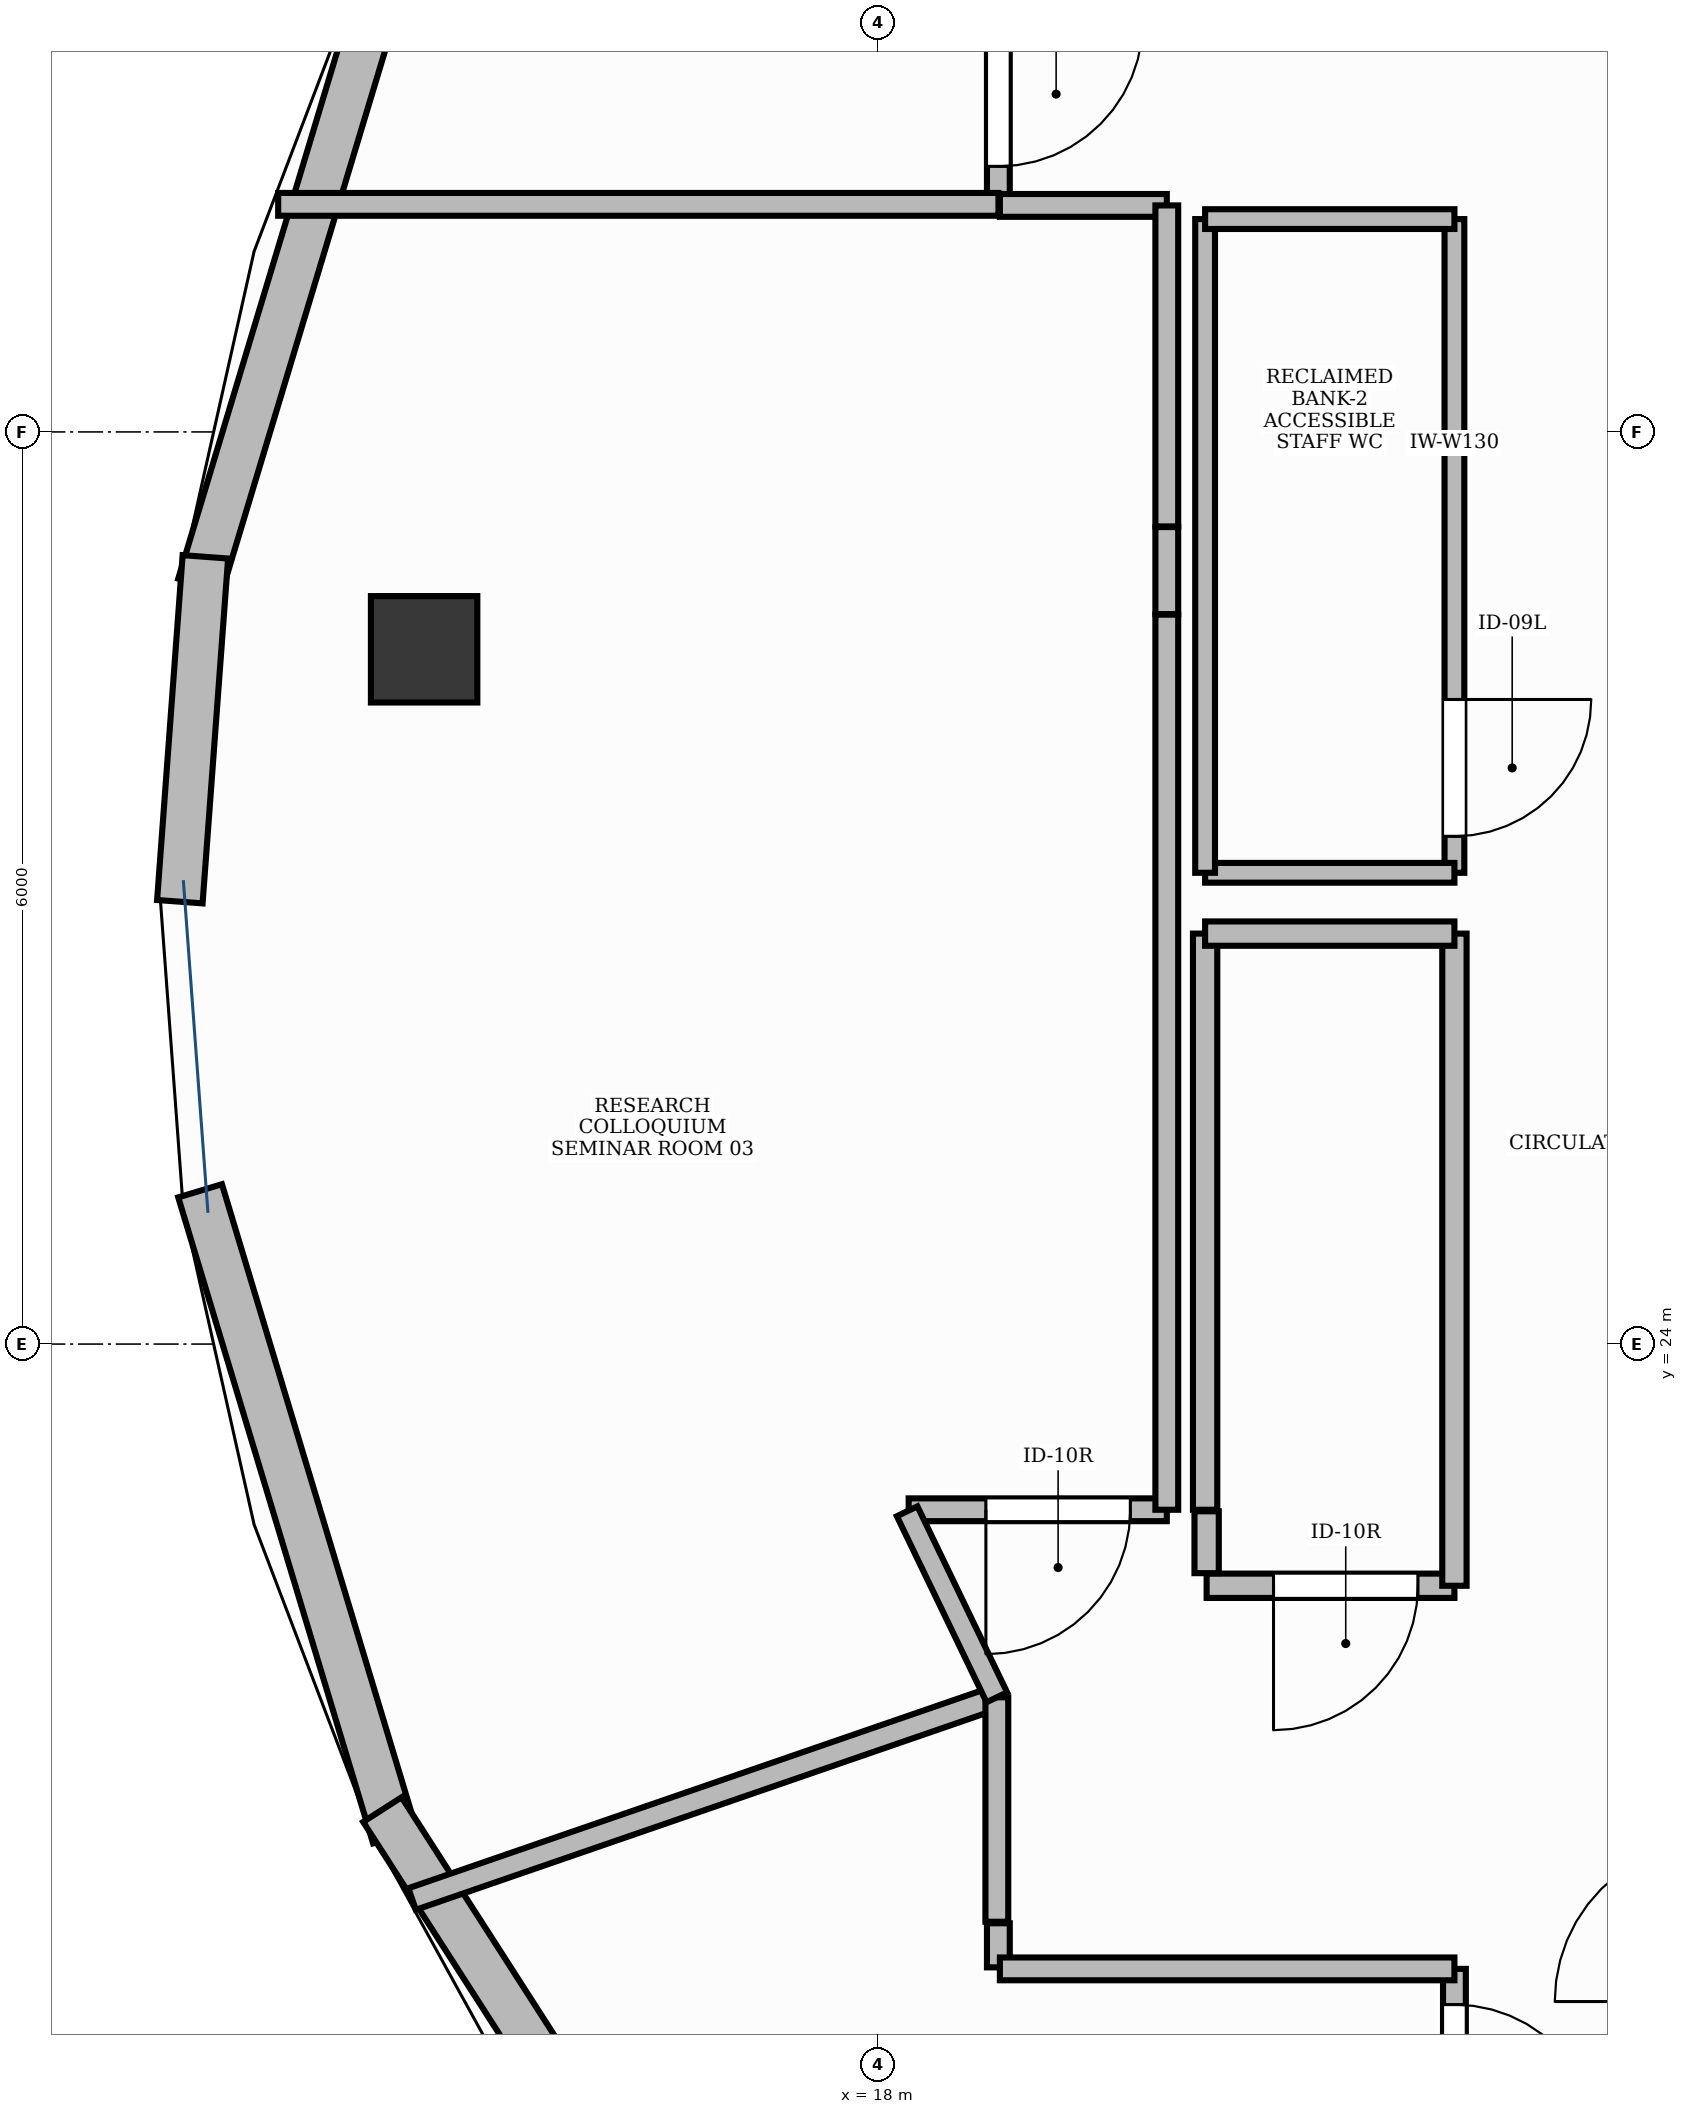
"""IFC4 building model, lengths in metres.
Left out: names, types, materials, properties, quantities, classifications, styles, units other than length and angle.
Written with IfcOpenShell. Run it as: python <this file> out.ifc"""

import sys

from ifc_helpers import new_model, si_unit, direction, frame, frame_2d, origin, origin_2d, place, context, subcontext, project, spatial, rectangle, extrude, element, fill, save


model = new_model("IFC4")
c1 = context("Model", 3, precision=1e-05, world=origin(), true_north=direction((0.0, 1.0)))
c2 = subcontext(c1, "Body", "Model", "MODEL_VIEW")
j1 = project(units=[si_unit("LENGTHUNIT", "METRE"), si_unit("PLANEANGLEUNIT", "RADIAN")], contexts=[c1])
p1 = place(None, origin())
s1 = spatial("IfcSite", under=j1, at=p1, CompositionType="ELEMENT")
p2 = place(p1, origin())
s2 = spatial("IfcBuilding", under=s1, at=p2, CompositionType="ELEMENT")
p3 = place(p2, frame((0.0, 0.0, 322.8)))
s3 = spatial("IfcBuildingStorey", under=s2, at=p3, CompositionType="ELEMENT", Elevation=322.8)
p4 = place(p3, frame((15.013, 28.57, -0.0), z_axis=(0.0, 0.0, 1.0), x_axis=(0.0, 1.0, 0.0)))
e1 = element("IfcColumn", 1, at=p4, inside=s3, PredefinedType="COLUMN", context=c2, shape_type="SweptSolid", body=[
    extrude(rectangle(XDim=0.7, YDim=0.7, at=origin_2d()), origin(), (0.0, 0.0, 1.0), 3.901),
])
p5 = place(p3, frame((14.821, 33.241, 0.0), z_axis=(0.0, 0.0, 1.0), x_axis=(-0.288720187326, -0.95741352269, 0.0)))
e2 = element("IfcWall", 2, at=p5, inside=s3, PredefinedType="STANDARD", context=c2, shape_type="SweptSolid", body=[
    extrude(rectangle(XDim=4.438, YDim=0.3, at=frame_2d((2.219, 0.0))), origin(), (0.0, 0.0, 1.0), 3.9),
])
p6 = place(p3, frame((13.573, 29.178, 0.0), z_axis=(0.0, 0.0, 1.0), x_axis=(-0.073741209899, -0.997277410735, 0.0)))
e3 = element("IfcWall", 3, at=p6, inside=s3, PredefinedType="STANDARD", context=c2, shape_type="SweptSolid", body=[
    extrude(rectangle(XDim=2.274, YDim=0.3, at=frame_2d((1.137, 0.0))), origin(), (0.0, 0.0, 1.0), 3.9),
])
p7 = place(p3, frame((13.539, 25.008, 0.0), z_axis=(0.0, 0.0, 1.0), x_axis=(0.288720187326, -0.95741352269, 0.0)))
e4 = element("IfcWall", 4, at=p7, inside=s3, PredefinedType="STANDARD", context=c2, shape_type="SweptSolid", body=[
    extrude(rectangle(XDim=4.438, YDim=0.3, at=frame_2d((2.219, 0.0))), origin(), (0.0, 0.0, 1.0), 3.9),
])
p8 = place(p3, frame((14.738, 20.938, 0.0), z_axis=(0.0, 0.0, 1.0), x_axis=(0.540087262842, -0.841609023547, 0.0)))
e5 = element("IfcWall", 5, at=p8, inside=s3, PredefinedType="STANDARD", context=c2, shape_type="SweptSolid", body=[
    extrude(rectangle(XDim=4.603, YDim=0.3, at=frame_2d((2.302, 0.0))), origin(), (0.0, 0.0, 1.0), 3.9),
])
p9 = place(p3, frame((21.79, 22.41, 0.0), z_axis=(0.0, 0.0, 1.0), x_axis=(-1.0, 0.0, 0.0)))
e6 = element("IfcWall", 6, at=p9, inside=s3, PredefinedType="PARTITIONING", context=c2, shape_type="SweptSolid", body=[
    extrude(rectangle(XDim=1.63, YDim=0.16, at=frame_2d((0.815, 0.0))), origin(), (0.0, 0.0, 1.0), 2.22),
])
p10 = place(p9, frame((0.24, 0.0, 0.0)))
e7 = element("IfcOpeningElement", 7, at=p10, cuts=e6, PredefinedType="OPENING", context=c2, shape_type="SweptSolid", body=[
    extrude(rectangle(XDim=0.95, YDim=2.15, at=frame_2d((0.475, 1.075))), frame((0.0, 0.095, 0.0), z_axis=(0.0, -1.0, 0.0), x_axis=(1.0, 0.0, 0.0)), (0.0, 0.0, 1.0), 0.19),
])
p11 = place(p3, frame((21.79, 31.4, 0.0), z_axis=(0.0, 0.0, 1.0), x_axis=(0.0, -1.0, 0.0)))
e8 = element("IfcWall", 8, at=p11, inside=s3, PredefinedType="PARTITIONING", context=c2, shape_type="SweptSolid", body=[
    extrude(rectangle(XDim=4.3, YDim=0.13, at=frame_2d((2.15, 0.0))), origin(), (0.0, 0.0, 1.0), 2.22),
])
p12 = place(p11, frame((3.16, 0.0, 0.0)))
e9 = element("IfcOpeningElement", 9, at=p12, cuts=e8, PredefinedType="OPENING", context=c2, shape_type="SweptSolid", body=[
    extrude(rectangle(XDim=0.9, YDim=2.15, at=frame_2d((0.45, 1.075))), frame((0.0, 0.08, 0.0), z_axis=(0.0, -1.0, 0.0), x_axis=(1.0, 0.0, 0.0)), (0.0, 0.0, 1.0), 0.16),
])
p13 = place(p3, frame((21.79, 19.89, 0.0), z_axis=(0.0, 0.0, 1.0), x_axis=(0.0, -1.0, 0.0)))
e10 = element("IfcWall", 10, at=p13, inside=s3, PredefinedType="PARTITIONING", context=c2, shape_type="SweptSolid", body=[
    extrude(rectangle(XDim=1.44, YDim=0.15, at=frame_2d((0.72, 0.0))), origin(), (0.0, 0.0, 1.0), 2.22),
])
p14 = place(p13, frame((0.235, 0.0, 0.0)))
e11 = element("IfcOpeningElement", 11, at=p14, cuts=e10, PredefinedType="OPENING", context=c2, shape_type="SweptSolid", body=[
    extrude(rectangle(XDim=0.95, YDim=2.15, at=frame_2d((0.475, 1.075))), frame((0.0, 0.09, 0.0), z_axis=(0.0, -1.0, 0.0), x_axis=(1.0, 0.0, 0.0)), (0.0, 0.0, 1.0), 0.18),
])
p15 = place(p3, frame((19.898, 22.91, 0.0), z_axis=(0.0, 0.0, 1.0), x_axis=(-1.0, 0.0, 0.0)))
e12 = element("IfcWall", 12, at=p15, inside=s3, PredefinedType="PARTITIONING", context=c2, shape_type="SweptSolid", body=[
    extrude(rectangle(XDim=1.698, YDim=0.15, at=frame_2d((0.849, 0.0))), origin(), (0.0, 0.0, 1.0), 2.22),
])
p16 = place(p15, frame((0.24, 0.0, 0.0)))
e13 = element("IfcOpeningElement", 13, at=p16, cuts=e12, PredefinedType="OPENING", context=c2, shape_type="SweptSolid", body=[
    extrude(rectangle(XDim=0.95, YDim=2.15, at=frame_2d((0.475, 1.075))), frame((0.0, 0.09, 0.0), z_axis=(0.0, -1.0, 0.0), x_axis=(1.0, 0.0, 0.0)), (0.0, 0.0, 1.0), 0.18),
])
p17 = place(p3, frame((18.79, 34.2, 0.0), z_axis=(0.0, 0.0, 1.0), x_axis=(0.0, -1.0, 0.0)))
e14 = element("IfcWall", 14, at=p17, inside=s3, PredefinedType="PARTITIONING", context=c2, shape_type="SweptSolid", body=[
    extrude(rectangle(XDim=2.693, YDim=0.15, at=frame_2d((1.346, 0.0))), origin(), (0.0, 0.0, 1.0), 2.22),
])
p18 = place(p17, frame((1.503, 0.0, 0.0)))
e15 = element("IfcOpeningElement", 15, at=p18, cuts=e14, PredefinedType="OPENING", context=c2, shape_type="SweptSolid", body=[
    extrude(rectangle(XDim=0.95, YDim=2.15, at=frame_2d((0.475, 1.075))), frame((0.0, 0.09, 0.0), z_axis=(0.0, -1.0, 0.0), x_axis=(1.0, 0.0, 0.0)), (0.0, 0.0, 1.0), 0.18),
])
p19 = place(p3, frame((21.79, 26.7, 0.0), z_axis=(0.0, 0.0, 1.0), x_axis=(0.0, -1.0, 0.0)))
e16 = element("IfcWall", 16, at=p19, inside=s3, PredefinedType="PARTITIONING", context=c2, shape_type="SweptSolid", body=[
    extrude(rectangle(XDim=4.29, YDim=0.16, at=frame_2d((2.145, 0.0))), origin(), (0.0, 0.0, 1.0), 2.22),
])
p20 = place(p3, frame((20.16, 22.493, 0.0), z_axis=(0.0, 0.0, 1.0), x_axis=(0.0, 1.0, 0.0)))
e17 = element("IfcWall", 17, at=p20, inside=s3, PredefinedType="PARTITIONING", context=c2, shape_type="SweptSolid", body=[
    extrude(rectangle(XDim=0.407, YDim=0.16, at=frame_2d((0.204, 0.0))), origin(), (0.0, 0.0, 1.0), 2.22),
])
p21 = place(p3, frame((20.15, 22.91, 0.0), z_axis=(0.0, 0.0, 1.0), x_axis=(0.0, 1.0, 0.0)))
e18 = element("IfcWall", 18, at=p21, inside=s3, PredefinedType="PARTITIONING", context=c2, shape_type="SweptSolid", body=[
    extrude(rectangle(XDim=3.79, YDim=0.16, at=frame_2d((1.895, 0.0))), origin(), (0.0, 0.0, 1.0), 2.22),
])
p22 = place(p3, frame((20.15, 26.7, 0.0), z_axis=(0.0, 0.0, 1.0), x_axis=(1.0, 0.0, 0.0)))
e19 = element("IfcWall", 19, at=p22, inside=s3, PredefinedType="PARTITIONING", context=c2, shape_type="SweptSolid", body=[
    extrude(rectangle(XDim=1.64, YDim=0.16, at=frame_2d((0.82, 0.0))), origin(), (0.0, 0.0, 1.0), 2.22),
])
p23 = place(p3, frame((21.79, 27.1, 0.0), z_axis=(0.0, 0.0, 1.0), x_axis=(-1.0, 0.0, 0.0)))
e20 = element("IfcWall", 20, at=p23, inside=s3, PredefinedType="PARTITIONING", context=c2, shape_type="SweptSolid", body=[
    extrude(rectangle(XDim=1.64, YDim=0.13, at=frame_2d((0.82, 0.0))), origin(), (0.0, 0.0, 1.0), 2.22),
])
p24 = place(p3, frame((20.15, 27.1, 0.0), z_axis=(0.0, 0.0, 1.0), x_axis=(0.0, 1.0, 0.0)))
e21 = element("IfcWall", 21, at=p24, inside=s3, PredefinedType="PARTITIONING", context=c2, shape_type="SweptSolid", body=[
    extrude(rectangle(XDim=4.3, YDim=0.13, at=frame_2d((2.15, 0.0))), origin(), (0.0, 0.0, 1.0), 2.22),
])
p25 = place(p3, frame((20.15, 31.4, 0.0), z_axis=(0.0, 0.0, 1.0), x_axis=(1.0, 0.0, 0.0)))
e22 = element("IfcWall", 22, at=p25, inside=s3, PredefinedType="PARTITIONING", context=c2, shape_type="SweptSolid", body=[
    extrude(rectangle(XDim=1.64, YDim=0.13, at=frame_2d((0.82, 0.0))), origin(), (0.0, 0.0, 1.0), 2.22),
])
p26 = place(p3, frame((14.934, 20.35, 0.0), z_axis=(0.0, 0.0, 1.0), x_axis=(0.945331527332, 0.326110875979, 0.0)))
e23 = element("IfcWall", 23, at=p26, inside=s3, PredefinedType="PARTITIONING", context=c2, shape_type="SweptSolid", body=[
    extrude(rectangle(XDim=4.069, YDim=0.15, at=frame_2d((2.034, 0.0))), origin(), (0.0, 0.0, 1.0), 2.22),
])
p27 = place(p3, frame((18.78, 21.677, 0.0), z_axis=(0.0, 0.0, 1.0), x_axis=(0.0, -1.0, 0.0)))
e24 = element("IfcWall", 24, at=p27, inside=s3, PredefinedType="PARTITIONING", context=c2, shape_type="SweptSolid", body=[
    extrude(rectangle(XDim=1.477, YDim=0.15, at=frame_2d((0.738, 0.0))), origin(), (0.0, 0.0, 1.0), 2.22),
])
p28 = place(p3, frame((18.79, 20.19, 0.0), z_axis=(0.0, 0.0, 1.0), x_axis=(0.0, -1.0, 0.0)))
e25 = element("IfcWall", 25, at=p28, inside=s3, PredefinedType="PARTITIONING", context=c2, shape_type="SweptSolid", body=[
    extrude(rectangle(XDim=0.29, YDim=0.15, at=frame_2d((0.145, 0.0))), origin(), (0.0, 0.0, 1.0), 2.22),
])
p29 = place(p3, frame((18.8, 19.89, 0.0), z_axis=(0.0, 0.0, 1.0), x_axis=(1.0, 0.0, 0.0)))
e26 = element("IfcWall", 26, at=p29, inside=s3, PredefinedType="PARTITIONING", context=c2, shape_type="SweptSolid", body=[
    extrude(rectangle(XDim=2.99, YDim=0.15, at=frame_2d((1.495, 0.0))), origin(), (0.0, 0.0, 1.0), 2.22),
])
p30 = place(p3, frame((14.052, 31.497, 0.0), z_axis=(0.0, 0.0, 1.0), x_axis=(1.0, 0.0, 0.0)))
e27 = element("IfcWall", 27, at=p30, inside=s3, PredefinedType="PARTITIONING", context=c2, shape_type="SweptSolid", body=[
    extrude(rectangle(XDim=4.738, YDim=0.15, at=frame_2d((2.369, 0.0))), origin(), (0.0, 0.0, 1.0), 2.22),
])
p31 = place(p3, frame((18.8, 31.49, 0.0), z_axis=(0.0, 0.0, 1.0), x_axis=(1.0, 0.0, 0.0)))
e28 = element("IfcWall", 28, at=p31, inside=s3, PredefinedType="PARTITIONING", context=c2, shape_type="SweptSolid", body=[
    extrude(rectangle(XDim=1.098, YDim=0.15, at=frame_2d((0.549, 0.0))), origin(), (0.0, 0.0, 1.0), 2.22),
])
p32 = place(p3, frame((19.898, 31.49, 0.0), z_axis=(0.0, 0.0, 1.0), x_axis=(0.0, -1.0, 0.0)))
e29 = element("IfcWall", 29, at=p32, inside=s3, PredefinedType="PARTITIONING", context=c2, shape_type="SweptSolid", body=[
    extrude(rectangle(XDim=2.112, YDim=0.15, at=frame_2d((1.056, 0.0))), origin(), (0.0, 0.0, 1.0), 2.22),
])
p33 = place(p3, frame((19.898, 29.374, 0.0), z_axis=(0.0, 0.0, 1.0), x_axis=(0.0, -1.0, 0.0)))
e30 = element("IfcWall", 30, at=p33, inside=s3, PredefinedType="PARTITIONING", context=c2, shape_type="SweptSolid", body=[
    extrude(rectangle(XDim=0.572, YDim=0.15, at=frame_2d((0.286, 0.0))), origin(), (0.0, 0.0, 1.0), 2.22),
])
p34 = place(p3, frame((19.898, 28.798, 0.0), z_axis=(0.0, 0.0, 1.0), x_axis=(0.0, -1.0, 0.0)))
e31 = element("IfcWall", 31, at=p34, inside=s3, PredefinedType="PARTITIONING", context=c2, shape_type="SweptSolid", body=[
    extrude(rectangle(XDim=5.888, YDim=0.15, at=frame_2d((2.944, 0.0))), origin(), (0.0, 0.0, 1.0), 2.22),
])
p35 = place(p3, frame((18.19, 22.9, 0.0), z_axis=(0.0, 0.0, 1.0), x_axis=(0.434442417688, -0.900699609034, 0.0)))
e32 = element("IfcWall", 32, at=p35, inside=s3, PredefinedType="PARTITIONING", context=c2, shape_type="SweptSolid", body=[
    extrude(rectangle(XDim=1.358, YDim=0.15, at=frame_2d((0.679, 0.0))), origin(), (0.0, 0.0, 1.0), 2.22),
])
p36 = place(p10, origin())
e33 = element("IfcDoor", 33, at=p36, inside=s3, OperationType="SINGLE_SWING_RIGHT", PredefinedType="DOOR", context=c2, shape_type="SweptSolid", body=[
    extrude(rectangle(XDim=0.95, YDim=2.15, at=frame_2d((0.475, 1.075))), frame((0.0, 0.025, 0.0), z_axis=(0.0, -1.0, 0.0), x_axis=(1.0, 0.0, 0.0)), (0.0, 0.0, 1.0), 0.05),
])
fill(e7, e33)
p37 = place(p12, origin())
e34 = element("IfcDoor", 34, at=p37, inside=s3, OperationType="SINGLE_SWING_LEFT", PredefinedType="DOOR", context=c2, shape_type="SweptSolid", body=[
    extrude(rectangle(XDim=0.9, YDim=2.15, at=frame_2d((0.45, 1.075))), frame((0.0, 0.025, 0.0), z_axis=(0.0, -1.0, 0.0), x_axis=(1.0, 0.0, 0.0)), (0.0, 0.0, 1.0), 0.05),
])
fill(e9, e34)
p38 = place(p14, origin())
e35 = element("IfcDoor", 35, at=p38, inside=s3, OperationType="SINGLE_SWING_RIGHT", PredefinedType="DOOR", context=c2, shape_type="SweptSolid", body=[
    extrude(rectangle(XDim=0.95, YDim=2.15, at=frame_2d((0.475, 1.075))), frame((0.0, 0.025, 0.0), z_axis=(0.0, -1.0, 0.0), x_axis=(1.0, 0.0, 0.0)), (0.0, 0.0, 1.0), 0.05),
])
fill(e11, e35)
p39 = place(p16, origin())
e36 = element("IfcDoor", 36, at=p39, inside=s3, OperationType="SINGLE_SWING_RIGHT", PredefinedType="DOOR", context=c2, shape_type="SweptSolid", body=[
    extrude(rectangle(XDim=0.95, YDim=2.15, at=frame_2d((0.475, 1.075))), frame((0.0, 0.025, 0.0), z_axis=(0.0, -1.0, 0.0), x_axis=(1.0, 0.0, 0.0)), (0.0, 0.0, 1.0), 0.05),
])
fill(e13, e36)
p40 = place(p18, origin())
e37 = element("IfcDoor", 37, at=p40, inside=s3, OperationType="SINGLE_SWING_LEFT", PredefinedType="DOOR", context=c2, shape_type="SweptSolid", body=[
    extrude(rectangle(XDim=0.95, YDim=2.15, at=frame_2d((0.475, 1.075))), frame((0.0, 0.025, 0.0), z_axis=(0.0, -1.0, 0.0), x_axis=(1.0, 0.0, 0.0)), (0.0, 0.0, 1.0), 0.05),
])
fill(e15, e37)
save(model, sys.argv[1])
